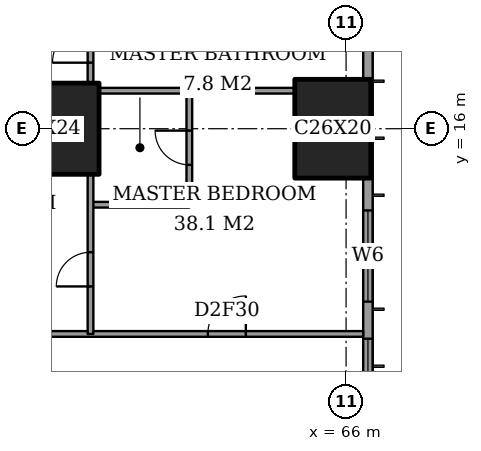
"""IFC4 building model, lengths in metres.
Left out: names, types, materials, properties, quantities, classifications, styles, units other than length and angle.
Written with IfcOpenShell. Run it as: python <this file> out.ifc"""

import sys

from ifc_helpers import new_model, si_unit, direction, frame, frame_2d, origin, origin_2d, place, context, subcontext, project, spatial, rectangle, extrude, element, fill, save


model = new_model("IFC4")
c1 = context("Model", 3, precision=1e-05, world=origin(), true_north=direction((0.0, 1.0)))
c2 = subcontext(c1, "Body", "Model", "MODEL_VIEW")
j1 = project(units=[si_unit("LENGTHUNIT", "METRE"), si_unit("PLANEANGLEUNIT", "RADIAN")], contexts=[c1])
p1 = place(None, origin())
s1 = spatial("IfcSite", under=j1, at=p1, CompositionType="ELEMENT")
p2 = place(p1, origin())
s2 = spatial("IfcBuilding", under=s1, at=p2, CompositionType="ELEMENT")
p3 = place(p2, frame((0.0, 0.0, 65.6)))
s3 = spatial("IfcBuildingStorey", under=s2, at=p3, CompositionType="ELEMENT", Elevation=65.6)
p4 = place(p3, frame((58.0, 16.0, 0.0), z_axis=(0.0, 0.0, 1.0), x_axis=(1.0, 0.0, 0.0)))
e1 = element("IfcColumn", 1, at=p4, inside=s3, PredefinedType="COLUMN", context=c2, shape_type="SweptSolid", body=[
    extrude(rectangle(XDim=3.0, YDim=2.4, at=origin_2d()), origin(), (0.0, 0.0, 1.0), 3.6),
])
p5 = place(p3, frame((65.65, 16.0, 0.0), z_axis=(0.0, 0.0, 1.0), x_axis=(0.0, 1.0, 0.0)))
e2 = element("IfcColumn", 2, at=p5, inside=s3, PredefinedType="COLUMN", context=c2, shape_type="SweptSolid", body=[
    extrude(rectangle(XDim=2.6, YDim=2.0, at=origin_2d()), origin(), (0.0, 0.0, 1.0), 3.6),
])
p6 = place(p3, frame((66.575, 3.175, 0.0), z_axis=(0.0, 0.0, 1.0), x_axis=(0.0, 1.0, 0.0)))
e3 = element("IfcWall", 3, at=p6, inside=s3, PredefinedType="SOLIDWALL", context=c2, shape_type="SweptSolid", body=[
    extrude(rectangle(XDim=41.65, YDim=0.25, at=frame_2d((20.825, 0.0))), origin(), (0.0, 0.0, 1.0), 3.6),
])
p7 = place(p6, frame((0.775, 0.0, 0.6)))
e4 = element("IfcOpeningElement", 4, at=p7, cuts=e3, PredefinedType="OPENING", context=c2, shape_type="SweptSolid", body=[
    extrude(rectangle(XDim=2.4, YDim=2.0, at=frame_2d((1.2, 1.0))), frame((0.0, 0.135, 0.0), z_axis=(0.0, -1.0, 0.0), x_axis=(1.0, 0.0, 0.0)), (0.0, 0.0, 1.0), 0.27),
])
p8 = place(p6, frame((6.1, 0.0, 0.6)))
e5 = element("IfcOpeningElement", 5, at=p8, cuts=e3, PredefinedType="OPENING", context=c2, shape_type="SweptSolid", body=[
    extrude(rectangle(XDim=1.2, YDim=2.0, at=frame_2d((0.6, 1.0))), frame((0.0, 0.135, 0.0), z_axis=(0.0, -1.0, 0.0), x_axis=(1.0, 0.0, 0.0)), (0.0, 0.0, 1.0), 0.27),
])
p9 = place(p6, frame((8.275, 0.0, 0.6)))
e6 = element("IfcOpeningElement", 6, at=p9, cuts=e3, PredefinedType="OPENING", context=c2, shape_type="SweptSolid", body=[
    extrude(rectangle(XDim=2.4, YDim=2.0, at=frame_2d((1.2, 1.0))), frame((0.0, 0.135, 0.0), z_axis=(0.0, -1.0, 0.0), x_axis=(1.0, 0.0, 0.0)), (0.0, 0.0, 1.0), 0.27),
])
p10 = place(p6, frame((15.775, 0.0, 0.6)))
e7 = element("IfcOpeningElement", 7, at=p10, cuts=e3, PredefinedType="OPENING", context=c2, shape_type="SweptSolid", body=[
    extrude(rectangle(XDim=2.4, YDim=2.0, at=frame_2d((1.2, 1.0))), frame((0.0, 0.135, 0.0), z_axis=(0.0, -1.0, 0.0), x_axis=(1.0, 0.0, 0.0)), (0.0, 0.0, 1.0), 0.27),
])
p11 = place(p6, frame((23.475, 0.0, 0.6)))
e8 = element("IfcOpeningElement", 8, at=p11, cuts=e3, PredefinedType="OPENING", context=c2, shape_type="SweptSolid", body=[
    extrude(rectangle(XDim=2.4, YDim=2.0, at=frame_2d((1.2, 1.0))), frame((0.0, 0.135, 0.0), z_axis=(0.0, -1.0, 0.0), x_axis=(1.0, 0.0, 0.0)), (0.0, 0.0, 1.0), 0.27),
])
p12 = place(p6, frame((30.875, 0.0, 0.6)))
e9 = element("IfcOpeningElement", 9, at=p12, cuts=e3, PredefinedType="OPENING", context=c2, shape_type="SweptSolid", body=[
    extrude(rectangle(XDim=2.4, YDim=2.0, at=frame_2d((1.2, 1.0))), frame((0.0, 0.135, 0.0), z_axis=(0.0, -1.0, 0.0), x_axis=(1.0, 0.0, 0.0)), (0.0, 0.0, 1.0), 0.27),
])
p13 = place(p6, frame((34.325, 0.0, 0.6)))
e10 = element("IfcOpeningElement", 10, at=p13, cuts=e3, PredefinedType="OPENING", context=c2, shape_type="SweptSolid", body=[
    extrude(rectangle(XDim=1.2, YDim=2.0, at=frame_2d((0.6, 1.0))), frame((0.0, 0.135, 0.0), z_axis=(0.0, -1.0, 0.0), x_axis=(1.0, 0.0, 0.0)), (0.0, 0.0, 1.0), 0.27),
])
p14 = place(p6, frame((38.475, 0.0, 0.6)))
e11 = element("IfcOpeningElement", 11, at=p14, cuts=e3, PredefinedType="OPENING", context=c2, shape_type="SweptSolid", body=[
    extrude(rectangle(XDim=2.4, YDim=2.0, at=frame_2d((1.2, 1.0))), frame((0.0, 0.135, 0.0), z_axis=(0.0, -1.0, 0.0), x_axis=(1.0, 0.0, 0.0)), (0.0, 0.0, 1.0), 0.27),
])
p15 = place(p3, frame((41.439, 10.6, 0.0), z_axis=(0.0, 0.0, 1.0), x_axis=(1.0, 0.0, 0.0)))
e12 = element("IfcWall", 12, at=p15, inside=s3, PredefinedType="PARTITIONING", context=c2, shape_type="SweptSolid", body=[
    extrude(rectangle(XDim=25.011, YDim=0.15, at=frame_2d((12.505, 0.0))), origin(), (0.0, 0.0, 1.0), 3.35),
])
p16 = place(p15, frame((11.961, 0.0, 0.0)))
e13 = element("IfcOpeningElement", 13, at=p16, cuts=e12, PredefinedType="OPENING", context=c2, shape_type="SweptSolid", body=[
    extrude(rectangle(XDim=1.0, YDim=2.1, at=frame_2d((0.5, 1.05))), frame((0.0, 0.085, 0.0), z_axis=(0.0, -1.0, 0.0), x_axis=(1.0, 0.0, 0.0)), (0.0, 0.0, 1.0), 0.17),
])
p17 = place(p15, frame((20.924, 0.0, 0.0)))
e14 = element("IfcOpeningElement", 14, at=p17, cuts=e12, PredefinedType="OPENING", context=c2, shape_type="SweptSolid", body=[
    extrude(rectangle(XDim=1.0, YDim=2.1, at=frame_2d((0.5, 1.05))), frame((0.0, 0.085, 0.0), z_axis=(0.0, -1.0, 0.0), x_axis=(1.0, 0.0, 0.0)), (0.0, 0.0, 1.0), 0.17),
])
p18 = place(p15, frame((9.561, 0.0, 0.0)))
e15 = element("IfcOpeningElement", 15, at=p18, cuts=e12, PredefinedType="OPENING", context=c2, shape_type="SweptSolid", body=[
    extrude(rectangle(XDim=1.0, YDim=2.1, at=frame_2d((0.5, 1.05))), frame((0.0, 0.085, 0.0), z_axis=(0.0, -1.0, 0.0), x_axis=(1.0, 0.0, 0.0)), (0.0, 0.0, 1.0), 0.17),
])
p19 = place(p15, frame((7.161, 0.0, 0.0)))
e16 = element("IfcOpeningElement", 16, at=p19, cuts=e12, PredefinedType="OPENING", context=c2, shape_type="SweptSolid", body=[
    extrude(rectangle(XDim=1.0, YDim=2.1, at=frame_2d((0.5, 1.05))), frame((0.0, 0.085, 0.0), z_axis=(0.0, -1.0, 0.0), x_axis=(1.0, 0.0, 0.0)), (0.0, 0.0, 1.0), 0.17),
])
p20 = place(p15, frame((2.836, 0.0, 0.0)))
e17 = element("IfcOpeningElement", 17, at=p20, cuts=e12, PredefinedType="OPENING", context=c2, shape_type="SweptSolid", body=[
    extrude(rectangle(XDim=1.0, YDim=2.1, at=frame_2d((0.5, 1.05))), frame((0.0, 0.085, 0.0), z_axis=(0.0, -1.0, 0.0), x_axis=(1.0, 0.0, 0.0)), (0.0, 0.0, 1.0), 0.17),
])
p21 = place(p3, frame((59.275, 14.0, 0.0), z_axis=(0.0, 0.0, 1.0), x_axis=(1.0, 0.0, 0.0)))
e18 = element("IfcWall", 18, at=p21, inside=s3, PredefinedType="PARTITIONING", context=c2, shape_type="SweptSolid", body=[
    extrude(rectangle(XDim=2.6, YDim=0.15, at=frame_2d((1.3, 0.0))), origin(), (0.0, 0.0, 1.0), 3.35),
])
p22 = place(p3, frame((59.5, 17.0, 0.0), z_axis=(0.0, 0.0, 1.0), x_axis=(1.0, 0.0, 0.0)))
e19 = element("IfcWall", 19, at=p22, inside=s3, PredefinedType="PARTITIONING", context=c2, shape_type="SweptSolid", body=[
    extrude(rectangle(XDim=5.15, YDim=0.15, at=frame_2d((2.575, 0.0))), origin(), (0.0, 0.0, 1.0), 3.35),
])
p23 = place(p3, frame((59.275, 10.6, 0.0), z_axis=(0.0, 0.0, 1.0), x_axis=(0.0, 1.0, 0.0)))
e20 = element("IfcWall", 20, at=p23, inside=s3, PredefinedType="PARTITIONING", context=c2, shape_type="SweptSolid", body=[
    extrude(rectangle(XDim=4.2, YDim=0.15, at=frame_2d((2.1, 0.0))), origin(), (0.0, 0.0, 1.0), 3.35),
])
p24 = place(p23, frame((1.25, 0.0, 0.0)))
e21 = element("IfcOpeningElement", 21, at=p24, cuts=e20, PredefinedType="OPENING", context=c2, shape_type="SweptSolid", body=[
    extrude(rectangle(XDim=0.9, YDim=2.1, at=frame_2d((0.45, 1.05))), frame((0.0, 0.085, 0.0), z_axis=(0.0, -1.0, 0.0), x_axis=(1.0, 0.0, 0.0)), (0.0, 0.0, 1.0), 0.17),
])
p25 = place(p3, frame((59.275, 17.2, 0.0), z_axis=(0.0, 0.0, 1.0), x_axis=(0.0, 1.0, 0.0)))
e22 = element("IfcWall", 22, at=p25, inside=s3, PredefinedType="PARTITIONING", context=c2, shape_type="SweptSolid", body=[
    extrude(rectangle(XDim=2.45, YDim=0.15, at=frame_2d((1.225, 0.0))), origin(), (0.0, 0.0, 1.0), 3.35),
])
p26 = place(p25, frame((0.538, 0.0, 0.0)))
e23 = element("IfcOpeningElement", 23, at=p26, cuts=e22, PredefinedType="OPENING", context=c2, shape_type="SweptSolid", body=[
    extrude(rectangle(XDim=1.0, YDim=2.1, at=frame_2d((0.5, 1.05))), frame((0.0, 0.085, 0.0), z_axis=(0.0, -1.0, 0.0), x_axis=(1.0, 0.0, 0.0)), (0.0, 0.0, 1.0), 0.17),
])
p27 = place(p3, frame((61.875, 14.0, 0.0), z_axis=(0.0, 0.0, 1.0), x_axis=(0.0, 1.0, 0.0)))
e24 = element("IfcWall", 24, at=p27, inside=s3, PredefinedType="PARTITIONING", context=c2, shape_type="SweptSolid", body=[
    extrude(rectangle(XDim=3.0, YDim=0.15, at=frame_2d((1.5, 0.0))), origin(), (0.0, 0.0, 1.0), 3.35),
])
p28 = place(p27, frame((1.05, 0.0, 0.0)))
e25 = element("IfcOpeningElement", 25, at=p28, cuts=e24, PredefinedType="OPENING", context=c2, shape_type="SweptSolid", body=[
    extrude(rectangle(XDim=0.9, YDim=2.1, at=frame_2d((0.45, 1.05))), frame((0.0, 0.085, 0.0), z_axis=(0.0, -1.0, 0.0), x_axis=(1.0, 0.0, 0.0)), (0.0, 0.0, 1.0), 0.17),
])
p29 = place(p8, origin())
e26 = element("IfcWindow", 26, at=p29, inside=s3, PartitioningType="SINGLE_PANEL", PredefinedType="WINDOW", context=c2, shape_type="SweptSolid", body=[
    extrude(rectangle(XDim=1.2, YDim=2.0, at=frame_2d((0.6, 1.0))), frame((0.0, 0.03, 0.0), z_axis=(0.0, -1.0, 0.0), x_axis=(1.0, 0.0, 0.0)), (0.0, 0.0, 1.0), 0.06),
])
fill(e5, e26)
p30 = place(p9, origin())
e27 = element("IfcWindow", 27, at=p30, inside=s3, PartitioningType="SINGLE_PANEL", PredefinedType="WINDOW", context=c2, shape_type="SweptSolid", body=[
    extrude(rectangle(XDim=2.4, YDim=2.0, at=frame_2d((1.2, 1.0))), frame((0.0, 0.03, 0.0), z_axis=(0.0, -1.0, 0.0), x_axis=(1.0, 0.0, 0.0)), (0.0, 0.0, 1.0), 0.06),
])
fill(e6, e27)
p31 = place(p28, origin())
e28 = element("IfcDoor", 28, at=p31, inside=s3, OperationType="SINGLE_SWING_LEFT", PredefinedType="DOOR", context=c2, shape_type="SweptSolid", body=[
    extrude(rectangle(XDim=0.9, YDim=2.1, at=frame_2d((0.45, 1.05))), frame((0.0, 0.025, 0.0), z_axis=(0.0, -1.0, 0.0), x_axis=(1.0, 0.0, 0.0)), (0.0, 0.0, 1.0), 0.05),
])
fill(e25, e28)
p32 = place(p17, origin())
e29 = element("IfcDoor", 29, at=p32, inside=s3, OperationType="SINGLE_SWING_LEFT", PredefinedType="DOOR", context=c2, shape_type="SweptSolid", body=[
    extrude(rectangle(XDim=1.0, YDim=2.1, at=frame_2d((0.5, 1.05))), frame((0.0, 0.025, 0.0), z_axis=(0.0, -1.0, 0.0), x_axis=(1.0, 0.0, 0.0)), (0.0, 0.0, 1.0), 0.05),
])
fill(e14, e29)
p33 = place(p26, origin())
e30 = element("IfcDoor", 30, at=p33, inside=s3, OperationType="SINGLE_SWING_RIGHT", PredefinedType="DOOR", context=c2, shape_type="SweptSolid", body=[
    extrude(rectangle(XDim=1.0, YDim=2.1, at=frame_2d((0.5, 1.05))), frame((0.0, 0.025, 0.0), z_axis=(0.0, -1.0, 0.0), x_axis=(1.0, 0.0, 0.0)), (0.0, 0.0, 1.0), 0.05),
])
fill(e23, e30)
p34 = place(p24, origin())
e31 = element("IfcDoor", 31, at=p34, inside=s3, OperationType="SINGLE_SWING_RIGHT", PredefinedType="DOOR", context=c2, shape_type="SweptSolid", body=[
    extrude(rectangle(XDim=0.9, YDim=2.1, at=frame_2d((0.45, 1.05))), frame((0.0, 0.025, 0.0), z_axis=(0.0, -1.0, 0.0), x_axis=(1.0, 0.0, 0.0)), (0.0, 0.0, 1.0), 0.05),
])
fill(e21, e31)
save(model, sys.argv[1])
